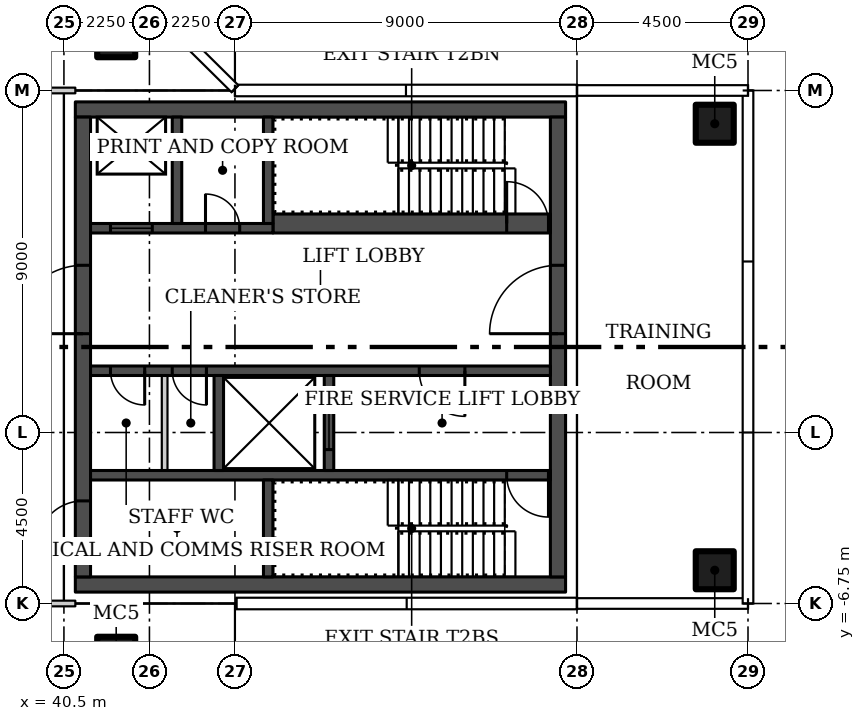
"""IFC4 building model, lengths in metres.
Left out: names, types, materials, properties, quantities, classifications, styles, units other than length and angle.
Written with IfcOpenShell. Run it as: python <this file> out.ifc"""

import sys

from ifc_helpers import new_model, si_unit, direction, frame, frame_2d, origin, origin_2d, place, context, subcontext, project, spatial, rectangle, hollow_rectangle, extrude, element, fill, save


model = new_model("IFC4")
c1 = context("Model", 3, precision=1e-05, world=origin(), true_north=direction((0.0, 1.0)))
c2 = subcontext(c1, "Body", "Model", "MODEL_VIEW")
j1 = project(units=[si_unit("LENGTHUNIT", "METRE"), si_unit("PLANEANGLEUNIT", "RADIAN")], contexts=[c1])
p1 = place(None, origin())
s1 = spatial("IfcSite", under=j1, at=p1, CompositionType="ELEMENT")
p2 = place(p1, origin())
s2 = spatial("IfcBuilding", under=s1, at=p2, CompositionType="ELEMENT")
p3 = place(p2, frame((0.0, 0.0, 221.7)))
s3 = spatial("IfcBuildingStorey", under=s2, at=p3, CompositionType="ELEMENT", Elevation=221.7)
for number, where in (
    (1, (41.875, 8.125, 0.0)),
    (2, (41.875, -8.125, 0.0)),
    (3, (57.625, -5.875, 0.0)),
    (4, (57.625, 5.875, 0.0)),
):
    element("IfcColumn", number, at=place(p3, frame(where)), inside=s3, PredefinedType="COLUMN", context=c2, shape_type="SweptSolid", body=[
        extrude(hollow_rectangle(XDim=1.0, YDim=1.0, WallThickness=0.04, at=origin_2d()), origin(), (0.0, 0.0, 1.0), 3.45),
    ])
p4 = place(p3, frame((26.7, 6.75, 0.0)))
e5 = element("IfcWall", 5, at=p4, inside=s3, PredefinedType="PARTITIONING", context=c2, shape_type="SweptSolid", body=[
    extrude(rectangle(XDim=14.1, YDim=0.15, at=frame_2d((7.05, 0.0))), origin(), (0.0, 0.0, 1.0), 3.45),
])
p5 = place(p4, frame((8.55, 0.0, 0.0)))
e6 = element("IfcOpeningElement", 6, at=p5, cuts=e5, PredefinedType="OPENING", context=c2, shape_type="SweptSolid", body=[
    extrude(rectangle(XDim=1.5, YDim=2.1, at=frame_2d((0.75, 1.05))), frame((0.0, 0.085, 0.0), z_axis=(0.0, -1.0, 0.0), x_axis=(1.0, 0.0, 0.0)), (0.0, 0.0, 1.0), 0.17),
])
p6 = place(p4, frame((1.8, 0.0, 0.0)))
e7 = element("IfcOpeningElement", 7, at=p6, cuts=e5, PredefinedType="OPENING", context=c2, shape_type="SweptSolid", body=[
    extrude(rectangle(XDim=1.5, YDim=2.1, at=frame_2d((0.75, 1.05))), frame((0.0, 0.085, 0.0), z_axis=(0.0, -1.0, 0.0), x_axis=(1.0, 0.0, 0.0)), (0.0, 0.0, 1.0), 0.17),
])
p7 = place(p3, frame((40.8, -6.75, 0.0), z_axis=(0.0, 0.0, 1.0), x_axis=(-1.0, 0.0, 0.0)))
e8 = element("IfcWall", 8, at=p7, inside=s3, PredefinedType="PARTITIONING", context=c2, shape_type="SweptSolid", body=[
    extrude(rectangle(XDim=14.1, YDim=0.15, at=frame_2d((7.05, 0.0))), origin(), (0.0, 0.0, 1.0), 3.45),
])
p8 = place(p7, frame((6.3, 0.0, 0.0)))
e9 = element("IfcOpeningElement", 9, at=p8, cuts=e8, PredefinedType="OPENING", context=c2, shape_type="SweptSolid", body=[
    extrude(rectangle(XDim=1.5, YDim=2.1, at=frame_2d((0.75, 1.05))), frame((0.0, 0.085, 0.0), z_axis=(0.0, -1.0, 0.0), x_axis=(1.0, 0.0, 0.0)), (0.0, 0.0, 1.0), 0.17),
])
for number, where, z_axis, x_axis in (
    (10, (53.7, -6.25, 0.0), (0.0, 0.0, 1.0), (-1.0, 0.0, 0.0)),
    (11, (53.7, 6.25, 0.0), (0.0, 0.0, 1.0), (-1.0, 0.0, 0.0)),
):
    element("IfcWall", number, at=place(p3, frame(where, z_axis=z_axis, x_axis=x_axis)), inside=s3, PredefinedType="SHEAR", context=c2, shape_type="SweptSolid", body=[
        extrude(rectangle(XDim=12.9, YDim=0.4, at=frame_2d((6.45, 0.0))), origin(), (0.0, 0.0, 1.0), 3.45),
    ])
p9 = place(p3, frame((53.5, -6.05, 0.0), z_axis=(0.0, 0.0, 1.0), x_axis=(0.0, 1.0, 0.0)))
e12 = element("IfcWall", 12, at=p9, inside=s3, PredefinedType="SHEAR", context=c2, shape_type="SweptSolid", body=[
    extrude(rectangle(XDim=12.1, YDim=0.4, at=frame_2d((6.05, 0.0))), origin(), (0.0, 0.0, 1.0), 3.45),
])
p10 = place(p9, frame((6.4, 0.0, 0.0)))
e13 = element("IfcOpeningElement", 13, at=p10, cuts=e12, PredefinedType="OPENING", context=c2, shape_type="SweptSolid", body=[
    extrude(rectangle(XDim=1.8, YDim=2.4, at=frame_2d((0.9, 1.2))), frame((0.0, 0.21, 0.0), z_axis=(0.0, -1.0, 0.0), x_axis=(1.0, 0.0, 0.0)), (0.0, 0.0, 1.0), 0.42),
])
p11 = place(p3, frame((41.0, -6.05, 0.0), z_axis=(0.0, 0.0, 1.0), x_axis=(0.0, 1.0, 0.0)))
e14 = element("IfcWall", 14, at=p11, inside=s3, PredefinedType="SHEAR", context=c2, shape_type="SweptSolid", body=[
    extrude(rectangle(XDim=12.1, YDim=0.4, at=frame_2d((6.05, 0.0))), origin(), (0.0, 0.0, 1.0), 3.45),
])
p12 = place(p11, frame((0.8, 0.0, 0.0)))
e15 = element("IfcOpeningElement", 15, at=p12, cuts=e14, PredefinedType="OPENING", context=c2, shape_type="SweptSolid", body=[
    extrude(rectangle(XDim=1.2, YDim=2.1, at=frame_2d((0.6, 1.05))), frame((0.0, 0.21, 0.0), z_axis=(0.0, -1.0, 0.0), x_axis=(1.0, 0.0, 0.0)), (0.0, 0.0, 1.0), 0.42),
])
p13 = place(p11, frame((6.4, 0.0, 0.0)))
e16 = element("IfcOpeningElement", 16, at=p13, cuts=e14, PredefinedType="OPENING", context=c2, shape_type="SweptSolid", body=[
    extrude(rectangle(XDim=1.8, YDim=2.4, at=frame_2d((0.9, 1.2))), frame((0.0, 0.21, 0.0), z_axis=(0.0, -1.0, 0.0), x_axis=(1.0, 0.0, 0.0)), (0.0, 0.0, 1.0), 0.42),
])
p14 = place(p3, frame((53.3, -3.375, 0.0), z_axis=(0.0, 0.0, 1.0), x_axis=(-1.0, 0.0, 0.0)))
e17 = element("IfcWall", 17, at=p14, inside=s3, PredefinedType="SHEAR", context=c2, shape_type="SweptSolid", body=[
    extrude(rectangle(XDim=12.1, YDim=0.25, at=frame_2d((6.05, 0.0))), origin(), (0.0, 0.0, 1.0), 3.45),
])
p15 = place(p14, frame((0.05, 0.0, 0.0)))
e18 = element("IfcOpeningElement", 18, at=p15, cuts=e17, PredefinedType="OPENING", context=c2, shape_type="SweptSolid", body=[
    extrude(rectangle(XDim=1.1, YDim=2.1, at=frame_2d((0.55, 1.05))), frame((0.0, 0.135, 0.0), z_axis=(0.0, -1.0, 0.0), x_axis=(1.0, 0.0, 0.0)), (0.0, 0.0, 1.0), 0.27),
])
p16 = place(p3, frame((45.875, -6.05, 0.0), z_axis=(0.0, 0.0, 1.0), x_axis=(0.0, 1.0, 0.0)))
e19 = element("IfcWall", 19, at=p16, inside=s3, PredefinedType="SHEAR", context=c2, shape_type="SweptSolid", body=[
    extrude(rectangle(XDim=2.55, YDim=0.25, at=frame_2d((1.275, 0.0))), origin(), (0.0, 0.0, 1.0), 3.45),
])
p17 = place(p3, frame((53.3, -0.625, 0.0), z_axis=(0.0, 0.0, 1.0), x_axis=(-1.0, 0.0, 0.0)))
e20 = element("IfcWall", 20, at=p17, inside=s3, PredefinedType="SHEAR", context=c2, shape_type="SweptSolid", body=[
    extrude(rectangle(XDim=12.1, YDim=0.25, at=frame_2d((6.05, 0.0))), origin(), (0.0, 0.0, 1.0), 3.45),
])
p18 = place(p17, frame((2.25, 0.0, 0.0)))
e21 = element("IfcOpeningElement", 21, at=p18, cuts=e20, PredefinedType="OPENING", context=c2, shape_type="SweptSolid", body=[
    extrude(rectangle(XDim=1.2, YDim=2.1, at=frame_2d((0.6, 1.05))), frame((0.0, 0.135, 0.0), z_axis=(0.0, -1.0, 0.0), x_axis=(1.0, 0.0, 0.0)), (0.0, 0.0, 1.0), 0.27),
])
p19 = place(p17, frame((9.05, 0.0, 0.0)))
e22 = element("IfcOpeningElement", 22, at=p19, cuts=e20, PredefinedType="OPENING", context=c2, shape_type="SweptSolid", body=[
    extrude(rectangle(XDim=0.9, YDim=2.1, at=frame_2d((0.45, 1.05))), frame((0.0, 0.135, 0.0), z_axis=(0.0, -1.0, 0.0), x_axis=(1.0, 0.0, 0.0)), (0.0, 0.0, 1.0), 0.27),
])
p20 = place(p17, frame((10.675, 0.0, 0.0)))
e23 = element("IfcOpeningElement", 23, at=p20, cuts=e20, PredefinedType="OPENING", context=c2, shape_type="SweptSolid", body=[
    extrude(rectangle(XDim=0.9, YDim=2.1, at=frame_2d((0.45, 1.05))), frame((0.0, 0.135, 0.0), z_axis=(0.0, -1.0, 0.0), x_axis=(1.0, 0.0, 0.0)), (0.0, 0.0, 1.0), 0.27),
])
p21 = place(p3, frame((47.475, -3.25, 0.0), z_axis=(0.0, 0.0, 1.0), x_axis=(0.0, 1.0, 0.0)))
e24 = element("IfcWall", 24, at=p21, inside=s3, PredefinedType="SHEAR", context=c2, shape_type="SweptSolid", body=[
    extrude(rectangle(XDim=2.5, YDim=0.25, at=frame_2d((1.25, 0.0))), origin(), (0.0, 0.0, 1.0), 3.45),
])
p22 = place(p21, frame((0.55, 0.0, 0.0)))
e25 = element("IfcOpeningElement", 25, at=p22, cuts=e24, PredefinedType="OPENING", context=c2, shape_type="SweptSolid", body=[
    extrude(rectangle(XDim=1.4, YDim=2.4, at=frame_2d((0.7, 1.2))), frame((0.0, 0.135, 0.0), z_axis=(0.0, -1.0, 0.0), x_axis=(1.0, 0.0, 0.0)), (0.0, 0.0, 1.0), 0.27),
])
p23 = place(p3, frame((44.575, -3.25, 0.0), z_axis=(0.0, 0.0, 1.0), x_axis=(0.0, 1.0, 0.0)))
e26 = element("IfcWall", 26, at=p23, inside=s3, PredefinedType="SHEAR", context=c2, shape_type="SweptSolid", body=[
    extrude(rectangle(XDim=2.5, YDim=0.25, at=frame_2d((1.25, 0.0))), origin(), (0.0, 0.0, 1.0), 3.45),
])
p24 = place(p3, frame((43.15, -3.25, 0.0), z_axis=(0.0, 0.0, 1.0), x_axis=(0.0, 1.0, 0.0)))
e27 = element("IfcWall", 27, at=p24, inside=s3, PredefinedType="PARTITIONING", context=c2, shape_type="SweptSolid", body=[
    extrude(rectangle(XDim=2.5, YDim=0.15, at=frame_2d((1.25, 0.0))), origin(), (0.0, 0.0, 1.0), 3.45),
])
p25 = place(p3, frame((46.0, 3.25, 0.0)))
e28 = element("IfcWall", 28, at=p25, inside=s3, PredefinedType="SHEAR", context=c2, shape_type="SweptSolid", body=[
    extrude(rectangle(XDim=7.3, YDim=0.5, at=frame_2d((3.65, 0.0))), origin(), (0.0, 0.0, 1.0), 3.45),
])
p26 = place(p25, frame((6.15, 0.0, 0.0)))
e29 = element("IfcOpeningElement", 29, at=p26, cuts=e28, PredefinedType="OPENING", context=c2, shape_type="SweptSolid", body=[
    extrude(rectangle(XDim=1.1, YDim=2.1, at=frame_2d((0.55, 1.05))), frame((0.0, 0.26, 0.0), z_axis=(0.0, -1.0, 0.0), x_axis=(1.0, 0.0, 0.0)), (0.0, 0.0, 1.0), 0.52),
])
p27 = place(p3, frame((41.2, 3.125, 0.0)))
e30 = element("IfcWall", 30, at=p27, inside=s3, PredefinedType="SHEAR", context=c2, shape_type="SweptSolid", body=[
    extrude(rectangle(XDim=4.8, YDim=0.25, at=frame_2d((2.4, 0.0))), origin(), (0.0, 0.0, 1.0), 3.45),
])
p28 = place(p27, frame((0.525, 0.0, 0.0)))
e31 = element("IfcOpeningElement", 31, at=p28, cuts=e30, PredefinedType="OPENING", context=c2, shape_type="SweptSolid", body=[
    extrude(rectangle(XDim=1.1, YDim=2.1, at=frame_2d((0.55, 1.05))), frame((0.0, 0.135, 0.0), z_axis=(0.0, -1.0, 0.0), x_axis=(1.0, 0.0, 0.0)), (0.0, 0.0, 1.0), 0.27),
])
p29 = place(p27, frame((3.025, 0.0, 0.0)))
e32 = element("IfcOpeningElement", 32, at=p29, cuts=e30, PredefinedType="OPENING", context=c2, shape_type="SweptSolid", body=[
    extrude(rectangle(XDim=0.9, YDim=2.1, at=frame_2d((0.45, 1.05))), frame((0.0, 0.135, 0.0), z_axis=(0.0, -1.0, 0.0), x_axis=(1.0, 0.0, 0.0)), (0.0, 0.0, 1.0), 0.27),
])
for number, where, z_axis, x_axis in (
    (33, (45.875, 3.25, 0.0), (0.0, 0.0, 1.0), (0.0, 1.0, 0.0)),
    (34, (43.475, 3.25, 0.0), (0.0, 0.0, 1.0), (0.0, 1.0, 0.0)),
):
    element("IfcWall", number, at=place(p3, frame(where, z_axis=z_axis, x_axis=x_axis)), inside=s3, PredefinedType="SHEAR", context=c2, shape_type="SweptSolid", body=[
        extrude(rectangle(XDim=2.8, YDim=0.25, at=frame_2d((1.4, 0.0))), origin(), (0.0, 0.0, 1.0), 3.45),
    ])
p30 = place(p10, origin())
e35 = element("IfcDoor", 35, at=p30, inside=s3, OperationType="DOUBLE_DOOR_SINGLE_SWING", PredefinedType="DOOR", context=c2, shape_type="SweptSolid", body=[
    extrude(rectangle(XDim=1.8, YDim=2.4, at=frame_2d((0.9, 1.2))), frame((0.0, 0.025, 0.0), z_axis=(0.0, -1.0, 0.0), x_axis=(1.0, 0.0, 0.0)), (0.0, 0.0, 1.0), 0.05),
])
fill(e13, e35)
p31 = place(p12, origin())
e36 = element("IfcDoor", 36, at=p31, inside=s3, OperationType="SINGLE_SWING_LEFT", PredefinedType="DOOR", context=c2, shape_type="SweptSolid", body=[
    extrude(rectangle(XDim=1.2, YDim=2.1, at=frame_2d((0.6, 1.05))), frame((0.0, 0.025, 0.0), z_axis=(0.0, -1.0, 0.0), x_axis=(1.0, 0.0, 0.0)), (0.0, 0.0, 1.0), 0.05),
])
fill(e15, e36)
p32 = place(p13, origin())
e37 = element("IfcDoor", 37, at=p32, inside=s3, OperationType="DOUBLE_DOOR_SINGLE_SWING", PredefinedType="DOOR", context=c2, shape_type="SweptSolid", body=[
    extrude(rectangle(XDim=1.8, YDim=2.4, at=frame_2d((0.9, 1.2))), frame((0.0, 0.025, 0.0), z_axis=(0.0, -1.0, 0.0), x_axis=(1.0, 0.0, 0.0)), (0.0, 0.0, 1.0), 0.05),
])
fill(e16, e37)
p33 = place(p15, origin())
e38 = element("IfcDoor", 38, at=p33, inside=s3, OperationType="SINGLE_SWING_LEFT", PredefinedType="DOOR", context=c2, shape_type="SweptSolid", body=[
    extrude(rectangle(XDim=1.1, YDim=2.1, at=frame_2d((0.55, 1.05))), frame((0.0, 0.025, 0.0), z_axis=(0.0, -1.0, 0.0), x_axis=(1.0, 0.0, 0.0)), (0.0, 0.0, 1.0), 0.05),
])
fill(e18, e38)
p34 = place(p18, origin())
e39 = element("IfcDoor", 39, at=p34, inside=s3, OperationType="SINGLE_SWING_LEFT", PredefinedType="DOOR", context=c2, shape_type="SweptSolid", body=[
    extrude(rectangle(XDim=1.2, YDim=2.1, at=frame_2d((0.6, 1.05))), frame((0.0, 0.025, 0.0), z_axis=(0.0, -1.0, 0.0), x_axis=(1.0, 0.0, 0.0)), (0.0, 0.0, 1.0), 0.05),
])
fill(e21, e39)
p35 = place(p19, origin())
e40 = element("IfcDoor", 40, at=p35, inside=s3, OperationType="SINGLE_SWING_RIGHT", PredefinedType="DOOR", context=c2, shape_type="SweptSolid", body=[
    extrude(rectangle(XDim=0.9, YDim=2.1, at=frame_2d((0.45, 1.05))), frame((0.0, 0.025, 0.0), z_axis=(0.0, -1.0, 0.0), x_axis=(1.0, 0.0, 0.0)), (0.0, 0.0, 1.0), 0.05),
])
fill(e22, e40)
p36 = place(p20, origin())
e41 = element("IfcDoor", 41, at=p36, inside=s3, OperationType="SINGLE_SWING_RIGHT", PredefinedType="DOOR", context=c2, shape_type="SweptSolid", body=[
    extrude(rectangle(XDim=0.9, YDim=2.1, at=frame_2d((0.45, 1.05))), frame((0.0, 0.025, 0.0), z_axis=(0.0, -1.0, 0.0), x_axis=(1.0, 0.0, 0.0)), (0.0, 0.0, 1.0), 0.05),
])
fill(e23, e41)
p37 = place(p22, origin())
e42 = element("IfcDoor", 42, at=p37, inside=s3, OperationType="SLIDING_TO_LEFT", PredefinedType="DOOR", context=c2, shape_type="SweptSolid", body=[
    extrude(rectangle(XDim=1.4, YDim=2.4, at=frame_2d((0.7, 1.2))), frame((0.0, 0.025, 0.0), z_axis=(0.0, -1.0, 0.0), x_axis=(1.0, 0.0, 0.0)), (0.0, 0.0, 1.0), 0.05),
])
fill(e25, e42)
p38 = place(p26, origin())
e43 = element("IfcDoor", 43, at=p38, inside=s3, OperationType="SINGLE_SWING_RIGHT", PredefinedType="DOOR", context=c2, shape_type="SweptSolid", body=[
    extrude(rectangle(XDim=1.1, YDim=2.1, at=frame_2d((0.55, 1.05))), frame((0.0, 0.025, 0.0), z_axis=(0.0, -1.0, 0.0), x_axis=(1.0, 0.0, 0.0)), (0.0, 0.0, 1.0), 0.05),
])
fill(e29, e43)
p39 = place(p28, origin())
e44 = element("IfcDoor", 44, at=p39, inside=s3, OperationType="SLIDING_TO_LEFT", PredefinedType="DOOR", context=c2, shape_type="SweptSolid", body=[
    extrude(rectangle(XDim=1.1, YDim=2.1, at=frame_2d((0.55, 1.05))), frame((0.0, 0.025, 0.0), z_axis=(0.0, -1.0, 0.0), x_axis=(1.0, 0.0, 0.0)), (0.0, 0.0, 1.0), 0.05),
])
fill(e31, e44)
p40 = place(p29, origin())
e45 = element("IfcDoor", 45, at=p40, inside=s3, OperationType="SINGLE_SWING_RIGHT", PredefinedType="DOOR", context=c2, shape_type="SweptSolid", body=[
    extrude(rectangle(XDim=0.9, YDim=2.1, at=frame_2d((0.45, 1.05))), frame((0.0, 0.025, 0.0), z_axis=(0.0, -1.0, 0.0), x_axis=(1.0, 0.0, 0.0)), (0.0, 0.0, 1.0), 0.05),
])
fill(e32, e45)
save(model, sys.argv[1])
